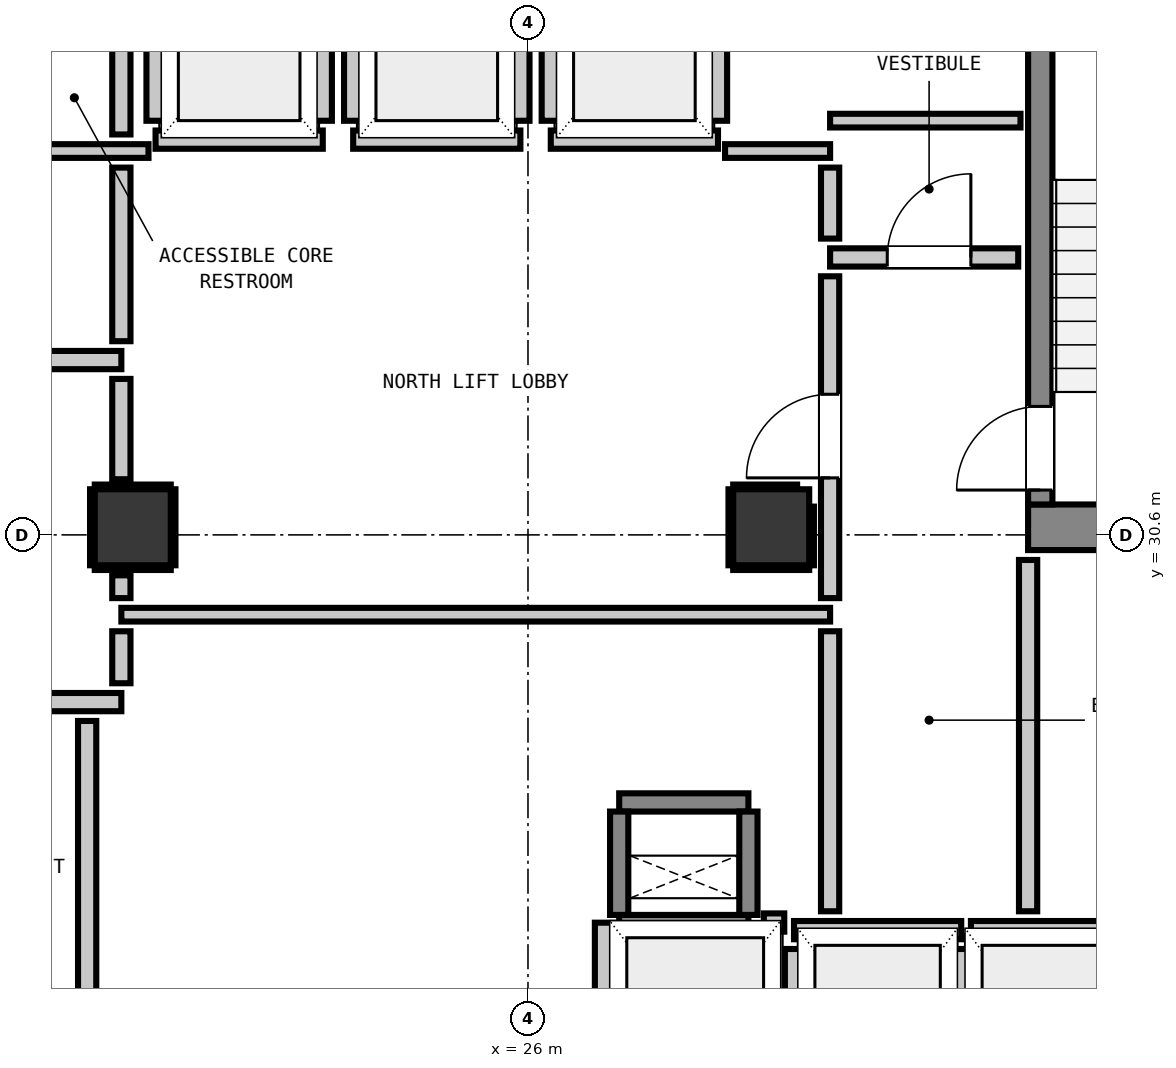
"""IFC4 building model, lengths in metres.
Left out: names, types, materials, properties, quantities, classifications, styles, units other than length and angle.
Written with IfcOpenShell. Run it as: python <this file> out.ifc"""

import sys

from ifc_helpers import new_model, si_unit, direction, frame, frame_2d, origin, origin_2d, place, context, subcontext, project, spatial, rectangle, extrude, element, fill, save


model = new_model("IFC4")
c1 = context("Model", 3, precision=1e-05, world=origin(), true_north=direction((0.0, 1.0)))
c2 = subcontext(c1, "Body", "Model", "MODEL_VIEW")
j1 = project(units=[si_unit("LENGTHUNIT", "METRE"), si_unit("PLANEANGLEUNIT", "RADIAN")], contexts=[c1])
p1 = place(None, origin())
s1 = spatial("IfcSite", under=j1, at=p1, CompositionType="ELEMENT")
p2 = place(p1, origin())
s2 = spatial("IfcBuilding", under=s1, at=p2, CompositionType="ELEMENT")
p3 = place(p2, frame((0.0, 0.0, 81.76)))
s3 = spatial("IfcBuildingStorey", under=s2, at=p3, CompositionType="ELEMENT", Elevation=81.76)
p4 = place(p3, frame((32.58, 30.7, 0.0), z_axis=(0.0, 0.0, 1.0), x_axis=(1.0, 0.0, 0.0)))
e1 = element("IfcWall", 1, at=p4, inside=s3, PredefinedType="SHEAR", context=c2, shape_type="SweptSolid", body=[
    extrude(rectangle(XDim=3.415, YDim=0.6, at=frame_2d((1.708, 0.0))), origin(), (0.0, 0.0, 1.0), 3.32),
])
p5 = place(p3, frame((32.74, 31.0, 0.0), z_axis=(0.0, 0.0, 1.0), x_axis=(0.0, 1.0, 0.0)))
e2 = element("IfcWall", 2, at=p5, inside=s3, PredefinedType="SHEAR", context=c2, shape_type="SweptSolid", body=[
    extrude(rectangle(XDim=7.8, YDim=0.32, at=frame_2d((3.9, 0.0))), origin(), (0.0, 0.0, 1.0), 3.32),
])
p6 = place(p5, frame((0.19, 0.0, 0.0)))
e3 = element("IfcOpeningElement", 3, at=p6, cuts=e2, PredefinedType="OPENING", context=c2, shape_type="SweptSolid", body=[
    extrude(rectangle(XDim=1.1, YDim=2.15, at=frame_2d((0.55, 1.075))), frame((0.0, 0.17, 0.0), z_axis=(0.0, -1.0, 0.0), x_axis=(1.0, 0.0, 0.0)), (0.0, 0.0, 1.0), 0.34),
])
for number, where, z_axis, x_axis in (
    (4, (27.2, 25.48, 0.0), (0.0, 0.0, 1.0), (1.0, 0.0, 0.0)),
    (5, (27.2, 27.08, 0.0), (0.0, 0.0, 1.0), (1.0, 0.0, 0.0)),
):
    element("IfcWall", number, at=place(p3, frame(where, z_axis=z_axis, x_axis=x_axis)), inside=s3, PredefinedType="SHEAR", context=c2, shape_type="SweptSolid", body=[
        extrude(rectangle(XDim=1.7, YDim=0.24, at=frame_2d((0.85, 0.0))), origin(), (0.0, 0.0, 1.0), 3.32),
    ])
for number, where, z_axis, x_axis in (
    (6, (27.2, 25.6, 0.0), (0.0, 0.0, 1.0), (0.0, 1.0, 0.0)),
    (7, (28.9, 25.6, 0.0), (0.0, 0.0, 1.0), (0.0, 1.0, 0.0)),
):
    element("IfcWall", number, at=place(p3, frame(where, z_axis=z_axis, x_axis=x_axis)), inside=s3, PredefinedType="SHEAR", context=c2, shape_type="SweptSolid", body=[
        extrude(rectangle(XDim=1.36, YDim=0.24, at=frame_2d((0.68, 0.0))), origin(), (0.0, 0.0, 1.0), 3.32),
    ])
for number, where, z_axis, x_axis in (
    (8, (20.8, 30.7, 0.0), (0.0, 0.0, 1.0), (1.0, 0.0, 0.0)),
    (9, (29.2, 30.7, 0.0), (0.0, 0.0, 1.0), (1.0, 0.0, 0.0)),
):
    element("IfcColumn", number, at=place(p3, frame(where, z_axis=z_axis, x_axis=x_axis)), inside=s3, PredefinedType="COLUMN", context=c2, shape_type="SweptSolid", body=[
        extrude(rectangle(XDim=1.0, YDim=1.0, at=origin_2d()), origin(), (0.0, 0.0, 1.0), 3.32),
    ])
p7 = place(p3, frame((21.1, 35.8, 0.0), z_axis=(0.0, 0.0, 1.0), x_axis=(1.0, 0.0, 0.0)))
e10 = element("IfcWall", 10, at=p7, inside=s3, PredefinedType="PARTITIONING", context=c2, shape_type="SweptSolid", body=[
    extrude(rectangle(XDim=2.2, YDim=0.24, at=frame_2d((1.1, 0.0))), origin(), (0.0, 0.0, 1.0), 3.06),
])
p8 = place(p3, frame((21.1, 36.048, 0.0), z_axis=(0.0, 0.0, 1.0), x_axis=(0.0, 1.0, 0.0)))
e11 = element("IfcWall", 11, at=p8, inside=s3, PredefinedType="PARTITIONING", context=c2, shape_type="SweptSolid", body=[
    extrude(rectangle(XDim=2.104, YDim=0.24, at=frame_2d((1.052, 0.0))), origin(), (0.0, 0.0, 1.0), 2.295),
])
p9 = place(p3, frame((23.3, 36.048, 0.0), z_axis=(0.0, 0.0, 1.0), x_axis=(0.0, 1.0, 0.0)))
e12 = element("IfcWall", 12, at=p9, inside=s3, PredefinedType="PARTITIONING", context=c2, shape_type="SweptSolid", body=[
    extrude(rectangle(XDim=2.104, YDim=0.24, at=frame_2d((1.052, 0.0))), origin(), (0.0, 0.0, 1.0), 3.06),
])
p10 = place(p3, frame((23.7, 35.8, 0.0), z_axis=(0.0, 0.0, 1.0), x_axis=(1.0, 0.0, 0.0)))
e13 = element("IfcWall", 13, at=p10, inside=s3, PredefinedType="PARTITIONING", context=c2, shape_type="SweptSolid", body=[
    extrude(rectangle(XDim=2.2, YDim=0.24, at=frame_2d((1.1, 0.0))), origin(), (0.0, 0.0, 1.0), 3.06),
])
for number, where, z_axis, x_axis in (
    (14, (23.7, 36.048, 0.0), (0.0, 0.0, 1.0), (0.0, 1.0, 0.0)),
    (15, (25.9, 36.048, 0.0), (0.0, 0.0, 1.0), (0.0, 1.0, 0.0)),
):
    element("IfcWall", number, at=place(p3, frame(where, z_axis=z_axis, x_axis=x_axis)), inside=s3, PredefinedType="PARTITIONING", context=c2, shape_type="SweptSolid", body=[
        extrude(rectangle(XDim=2.104, YDim=0.24, at=frame_2d((1.052, 0.0))), origin(), (0.0, 0.0, 1.0), 3.06),
    ])
p11 = place(p3, frame((26.3, 35.8, 0.0), z_axis=(0.0, 0.0, 1.0), x_axis=(1.0, 0.0, 0.0)))
e16 = element("IfcWall", 16, at=p11, inside=s3, PredefinedType="PARTITIONING", context=c2, shape_type="SweptSolid", body=[
    extrude(rectangle(XDim=2.2, YDim=0.24, at=frame_2d((1.1, 0.0))), origin(), (0.0, 0.0, 1.0), 3.06),
])
for number, where, z_axis, x_axis in (
    (17, (26.3, 36.048, 0.0), (0.0, 0.0, 1.0), (0.0, 1.0, 0.0)),
    (18, (28.5, 36.048, 0.0), (0.0, 0.0, 1.0), (0.0, 1.0, 0.0)),
):
    element("IfcWall", number, at=place(p3, frame(where, z_axis=z_axis, x_axis=x_axis)), inside=s3, PredefinedType="PARTITIONING", context=c2, shape_type="SweptSolid", body=[
        extrude(rectangle(XDim=2.104, YDim=0.24, at=frame_2d((1.052, 0.0))), origin(), (0.0, 0.0, 1.0), 3.06),
    ])
p12 = place(p3, frame((29.5, 25.4, 0.0), z_axis=(0.0, 0.0, 1.0), x_axis=(1.0, 0.0, 0.0)))
e19 = element("IfcWall", 19, at=p12, inside=s3, PredefinedType="PARTITIONING", context=c2, shape_type="SweptSolid", body=[
    extrude(rectangle(XDim=2.2, YDim=0.24, at=frame_2d((1.1, 0.0))), origin(), (0.0, 0.0, 1.0), 3.06),
])
p13 = place(p3, frame((29.5, 22.632, 0.0), z_axis=(0.0, 0.0, 1.0), x_axis=(0.0, 1.0, 0.0)))
e20 = element("IfcWall", 20, at=p13, inside=s3, PredefinedType="PARTITIONING", context=c2, shape_type="SweptSolid", body=[
    extrude(rectangle(XDim=2.52, YDim=0.24, at=frame_2d((1.26, 0.0))), origin(), (0.0, 0.0, 1.0), 2.295),
])
p14 = place(p3, frame((31.7, 22.73, 0.0), z_axis=(0.0, 0.0, 1.0), x_axis=(0.0, 1.0, 0.0)))
e21 = element("IfcWall", 21, at=p14, inside=s3, PredefinedType="PARTITIONING", context=c2, shape_type="SweptSolid", body=[
    extrude(rectangle(XDim=2.422, YDim=0.24, at=frame_2d((1.211, 0.0))), origin(), (0.0, 0.0, 1.0), 3.06),
])
p15 = place(p3, frame((31.828, 25.4, 0.0), z_axis=(0.0, 0.0, 1.0), x_axis=(1.0, 0.0, 0.0)))
e22 = element("IfcWall", 22, at=p15, inside=s3, PredefinedType="PARTITIONING", context=c2, shape_type="SweptSolid", body=[
    extrude(rectangle(XDim=2.072, YDim=0.24, at=frame_2d((1.036, 0.0))), origin(), (0.0, 0.0, 1.0), 3.06),
])
p16 = place(p3, frame((29.103, 25.5, 0.0), z_axis=(0.0, 0.0, 1.0), x_axis=(1.0, 0.0, 0.0)))
e23 = element("IfcWall", 23, at=p16, inside=s3, PredefinedType="PARTITIONING", context=c2, shape_type="SweptSolid", body=[
    extrude(rectangle(XDim=0.269, YDim=0.24, at=frame_2d((0.135, 0.0))), origin(), (0.0, 0.0, 1.0), 3.06),
])
p17 = place(p3, frame((27.0, 22.73, 0.0), z_axis=(0.0, 0.0, 1.0), x_axis=(0.0, 1.0, 0.0)))
e24 = element("IfcWall", 24, at=p17, inside=s3, PredefinedType="PARTITIONING", context=c2, shape_type="SweptSolid", body=[
    extrude(rectangle(XDim=2.768, YDim=0.24, at=frame_2d((1.384, 0.0))), origin(), (0.0, 0.0, 1.0), 3.06),
])
p18 = place(p3, frame((17.45, 28.4, 0.0), z_axis=(0.0, 0.0, 1.0), x_axis=(1.0, 0.0, 0.0)))
e25 = element("IfcWall", 25, at=p18, inside=s3, PredefinedType="PARTITIONING", context=c2, shape_type="SweptSolid", body=[
    extrude(rectangle(XDim=3.2, YDim=0.24, at=frame_2d((1.6, 0.0))), origin(), (0.0, 0.0, 1.0), 3.06),
])
p19 = place(p18, frame((0.784, 0.0, 0.0)))
e26 = element("IfcOpeningElement", 26, at=p19, cuts=e25, PredefinedType="OPENING", context=c2, shape_type="SweptSolid", body=[
    extrude(rectangle(XDim=1.1, YDim=2.15, at=frame_2d((0.55, 1.075))), frame((0.0, 0.13, 0.0), z_axis=(0.0, -1.0, 0.0), x_axis=(1.0, 0.0, 0.0)), (0.0, 0.0, 1.0), 0.26),
])
p20 = place(p3, frame((17.45, 32.9, 0.0), z_axis=(0.0, 0.0, 1.0), x_axis=(1.0, 0.0, 0.0)))
e27 = element("IfcWall", 27, at=p20, inside=s3, PredefinedType="PARTITIONING", context=c2, shape_type="SweptSolid", body=[
    extrude(rectangle(XDim=3.2, YDim=0.24, at=frame_2d((1.6, 0.0))), origin(), (0.0, 0.0, 1.0), 3.06),
])
p21 = place(p20, frame((0.159, 0.0, 0.0)))
e28 = element("IfcOpeningElement", 28, at=p21, cuts=e27, PredefinedType="OPENING", context=c2, shape_type="SweptSolid", body=[
    extrude(rectangle(XDim=1.1, YDim=2.15, at=frame_2d((0.55, 1.075))), frame((0.0, 0.13, 0.0), z_axis=(0.0, -1.0, 0.0), x_axis=(1.0, 0.0, 0.0)), (0.0, 0.0, 1.0), 0.26),
])
p22 = place(p3, frame((29.975, 34.25, 0.0), z_axis=(0.0, 0.0, 1.0), x_axis=(1.0, 0.0, 0.0)))
e29 = element("IfcWall", 29, at=p22, inside=s3, PredefinedType="PARTITIONING", context=c2, shape_type="SweptSolid", body=[
    extrude(rectangle(XDim=2.475, YDim=0.24, at=frame_2d((1.237, 0.0))), origin(), (0.0, 0.0, 1.0), 3.06),
])
p23 = place(p22, frame((0.752, 0.0, 0.0)))
e30 = element("IfcOpeningElement", 30, at=p23, cuts=e29, PredefinedType="OPENING", context=c2, shape_type="SweptSolid", body=[
    extrude(rectangle(XDim=1.1, YDim=2.15, at=frame_2d((0.55, 1.075))), frame((0.0, 0.13, 0.0), z_axis=(0.0, -1.0, 0.0), x_axis=(1.0, 0.0, 0.0)), (0.0, 0.0, 1.0), 0.26),
])
p24 = place(p3, frame((20.65, 29.55, 0.0), z_axis=(0.0, 0.0, 1.0), x_axis=(1.0, 0.0, 0.0)))
e31 = element("IfcWall", 31, at=p24, inside=s3, PredefinedType="PARTITIONING", context=c2, shape_type="SweptSolid", body=[
    extrude(rectangle(XDim=9.325, YDim=0.18, at=frame_2d((4.663, 0.0))), origin(), (0.0, 0.0, 1.0), 3.06),
])
p25 = place(p3, frame((18.95, 35.65, 0.0), z_axis=(0.0, 0.0, 1.0), x_axis=(1.0, 0.0, 0.0)))
e32 = element("IfcWall", 32, at=p25, inside=s3, PredefinedType="PARTITIONING", context=c2, shape_type="SweptSolid", body=[
    extrude(rectangle(XDim=2.057, YDim=0.18, at=frame_2d((1.029, 0.0))), origin(), (0.0, 0.0, 1.0), 3.06),
])
p26 = place(p3, frame((28.593, 35.65, 0.0), z_axis=(0.0, 0.0, 1.0), x_axis=(1.0, 0.0, 0.0)))
e33 = element("IfcWall", 33, at=p26, inside=s3, PredefinedType="PARTITIONING", context=c2, shape_type="SweptSolid", body=[
    extrude(rectangle(XDim=1.382, YDim=0.18, at=frame_2d((0.691, 0.0))), origin(), (0.0, 0.0, 1.0), 3.06),
])
p27 = place(p3, frame((29.975, 36.05, 0.0), z_axis=(0.0, 0.0, 1.0), x_axis=(1.0, 0.0, 0.0)))
e34 = element("IfcWall", 34, at=p27, inside=s3, PredefinedType="PARTITIONING", context=c2, shape_type="SweptSolid", body=[
    extrude(rectangle(XDim=2.505, YDim=0.18, at=frame_2d((1.252, 0.0))), origin(), (0.0, 0.0, 1.0), 3.06),
])
p28 = place(p3, frame((20.2, 22.586, 0.0), z_axis=(0.0, 0.0, 1.0), x_axis=(0.0, 1.0, 0.0)))
e35 = element("IfcWall", 35, at=p28, inside=s3, PredefinedType="PARTITIONING", context=c2, shape_type="SweptSolid", body=[
    extrude(rectangle(XDim=5.566, YDim=0.24, at=frame_2d((2.783, 0.0))), origin(), (0.0, 0.0, 1.0), 3.06),
])
p29 = place(p3, frame((20.65, 28.648, 0.0), z_axis=(0.0, 0.0, 1.0), x_axis=(0.0, 1.0, 0.0)))
e36 = element("IfcWall", 36, at=p29, inside=s3, PredefinedType="PARTITIONING", context=c2, shape_type="SweptSolid", body=[
    extrude(rectangle(XDim=0.684, YDim=0.24, at=frame_2d((0.342, 0.0))), origin(), (0.0, 0.0, 1.0), 2.295),
])
p30 = place(p3, frame((20.65, 29.768, 0.0), z_axis=(0.0, 0.0, 1.0), x_axis=(0.0, 1.0, 0.0)))
e37 = element("IfcWall", 37, at=p30, inside=s3, PredefinedType="PARTITIONING", context=c2, shape_type="SweptSolid", body=[
    extrude(rectangle(XDim=0.3, YDim=0.24, at=frame_2d((0.15, 0.0))), origin(), (0.0, 0.0, 1.0), 2.295),
])
p31 = place(p3, frame((20.65, 31.332, 0.0), z_axis=(0.0, 0.0, 1.0), x_axis=(0.0, 1.0, 0.0)))
e38 = element("IfcWall", 38, at=p31, inside=s3, PredefinedType="PARTITIONING", context=c2, shape_type="SweptSolid", body=[
    extrude(rectangle(XDim=1.32, YDim=0.24, at=frame_2d((0.66, 0.0))), origin(), (0.0, 0.0, 1.0), 2.295),
])
p32 = place(p3, frame((20.65, 33.148, 0.0), z_axis=(0.0, 0.0, 1.0), x_axis=(0.0, 1.0, 0.0)))
e39 = element("IfcWall", 39, at=p32, inside=s3, PredefinedType="PARTITIONING", context=c2, shape_type="SweptSolid", body=[
    extrude(rectangle(XDim=2.284, YDim=0.24, at=frame_2d((1.142, 0.0))), origin(), (0.0, 0.0, 1.0), 2.295),
])
p33 = place(p3, frame((20.65, 35.868, 0.0), z_axis=(0.0, 0.0, 1.0), x_axis=(0.0, 1.0, 0.0)))
e40 = element("IfcWall", 40, at=p33, inside=s3, PredefinedType="PARTITIONING", context=c2, shape_type="SweptSolid", body=[
    extrude(rectangle(XDim=2.684, YDim=0.24, at=frame_2d((1.342, 0.0))), origin(), (0.0, 0.0, 1.0), 2.295),
])
p34 = place(p3, frame((29.975, 25.648, 0.0), z_axis=(0.0, 0.0, 1.0), x_axis=(0.0, 1.0, 0.0)))
e41 = element("IfcWall", 41, at=p34, inside=s3, PredefinedType="PARTITIONING", context=c2, shape_type="SweptSolid", body=[
    extrude(rectangle(XDim=3.684, YDim=0.24, at=frame_2d((1.842, 0.0))), origin(), (0.0, 0.0, 1.0), 3.06),
])
p35 = place(p3, frame((29.975, 29.768, 0.0), z_axis=(0.0, 0.0, 1.0), x_axis=(0.0, 1.0, 0.0)))
e42 = element("IfcWall", 42, at=p35, inside=s3, PredefinedType="PARTITIONING", context=c2, shape_type="SweptSolid", body=[
    extrude(rectangle(XDim=4.234, YDim=0.24, at=frame_2d((2.117, 0.0))), origin(), (0.0, 0.0, 1.0), 3.06),
])
p36 = place(p35, frame((1.582, 0.0, 0.0)))
e43 = element("IfcOpeningElement", 43, at=p36, cuts=e42, PredefinedType="OPENING", context=c2, shape_type="SweptSolid", body=[
    extrude(rectangle(XDim=1.1, YDim=2.15, at=frame_2d((0.55, 1.075))), frame((0.0, 0.13, 0.0), z_axis=(0.0, -1.0, 0.0), x_axis=(1.0, 0.0, 0.0)), (0.0, 0.0, 1.0), 0.26),
])
p37 = place(p3, frame((29.975, 34.498, 0.0), z_axis=(0.0, 0.0, 1.0), x_axis=(0.0, 1.0, 0.0)))
e44 = element("IfcWall", 44, at=p37, inside=s3, PredefinedType="PARTITIONING", context=c2, shape_type="SweptSolid", body=[
    extrude(rectangle(XDim=0.934, YDim=0.24, at=frame_2d((0.467, 0.0))), origin(), (0.0, 0.0, 1.0), 3.06),
])
p38 = place(p3, frame((32.58, 25.648, 0.0), z_axis=(0.0, 0.0, 1.0), x_axis=(0.0, 1.0, 0.0)))
e45 = element("IfcWall", 45, at=p38, inside=s3, PredefinedType="PARTITIONING", context=c2, shape_type="SweptSolid", body=[
    extrude(rectangle(XDim=4.622, YDim=0.24, at=frame_2d((2.311, 0.0))), origin(), (0.0, 0.0, 1.0), 3.06),
])
for number, where, z_axis, x_axis in (
    (46, (20.3, 30.168, 0.0), (0.0, 0.0, 1.0), (1.0, 0.0, 0.0)),
    (47, (20.3, 31.232, 0.0), (0.0, 0.0, 1.0), (1.0, 0.0, 0.0)),
    (48, (20.268, 30.2, 0.0), (0.0, 0.0, 1.0), (0.0, 1.0, 0.0)),
    (49, (21.332, 30.2, 0.0), (0.0, 0.0, 1.0), (0.0, 1.0, 0.0)),
    (50, (28.7, 30.168, 0.0), (0.0, 0.0, 1.0), (1.0, 0.0, 0.0)),
):
    element("IfcWall", number, at=place(p3, frame(where, z_axis=z_axis, x_axis=x_axis)), inside=s3, PredefinedType="PARTITIONING", context=c2, shape_type="SweptSolid", body=[
        extrude(rectangle(XDim=1.0, YDim=0.06, at=frame_2d((0.5, 0.0))), origin(), (0.0, 0.0, 1.0), 1.45),
    ])
p39 = place(p3, frame((28.7, 31.232, 0.0), z_axis=(0.0, 0.0, 1.0), x_axis=(1.0, 0.0, 0.0)))
e51 = element("IfcWall", 51, at=p39, inside=s3, PredefinedType="PARTITIONING", context=c2, shape_type="SweptSolid", body=[
    extrude(rectangle(XDim=0.841, YDim=0.06, at=frame_2d((0.42, 0.0))), origin(), (0.0, 0.0, 1.0), 1.45),
])
p40 = place(p3, frame((28.668, 30.2, 0.0), z_axis=(0.0, 0.0, 1.0), x_axis=(0.0, 1.0, 0.0)))
e52 = element("IfcWall", 52, at=p40, inside=s3, PredefinedType="PARTITIONING", context=c2, shape_type="SweptSolid", body=[
    extrude(rectangle(XDim=1.0, YDim=0.06, at=frame_2d((0.5, 0.0))), origin(), (0.0, 0.0, 1.0), 1.45),
])
p41 = place(p3, frame((29.732, 30.2, 0.0), z_axis=(0.0, 0.0, 1.0), x_axis=(0.0, 1.0, 0.0)))
e53 = element("IfcWall", 53, at=p41, inside=s3, PredefinedType="PARTITIONING", context=c2, shape_type="SweptSolid", body=[
    extrude(rectangle(XDim=0.772, YDim=0.06, at=frame_2d((0.386, 0.0))), origin(), (0.0, 0.0, 1.0), 1.45),
])
p42 = place(p6, origin())
e54 = element("IfcDoor", 54, at=p42, inside=s3, OperationType="SINGLE_SWING_LEFT", PredefinedType="DOOR", context=c2, shape_type="SweptSolid", body=[
    extrude(rectangle(XDim=1.1, YDim=2.15, at=frame_2d((0.55, 1.075))), frame((0.0, 0.025, 0.0), z_axis=(0.0, -1.0, 0.0), x_axis=(1.0, 0.0, 0.0)), (0.0, 0.0, 1.0), 0.05),
])
fill(e3, e54)
p43 = place(p36, origin())
e55 = element("IfcDoor", 55, at=p43, inside=s3, OperationType="SINGLE_SWING_LEFT", PredefinedType="DOOR", context=c2, shape_type="SweptSolid", body=[
    extrude(rectangle(XDim=1.1, YDim=2.15, at=frame_2d((0.55, 1.075))), frame((0.0, 0.025, 0.0), z_axis=(0.0, -1.0, 0.0), x_axis=(1.0, 0.0, 0.0)), (0.0, 0.0, 1.0), 0.05),
])
fill(e43, e55)
p44 = place(p23, origin())
e56 = element("IfcDoor", 56, at=p44, inside=s3, OperationType="SINGLE_SWING_RIGHT", PredefinedType="DOOR", context=c2, shape_type="SweptSolid", body=[
    extrude(rectangle(XDim=1.1, YDim=2.15, at=frame_2d((0.55, 1.075))), frame((0.0, 0.025, 0.0), z_axis=(0.0, -1.0, 0.0), x_axis=(1.0, 0.0, 0.0)), (0.0, 0.0, 1.0), 0.05),
])
fill(e30, e56)
save(model, sys.argv[1])
